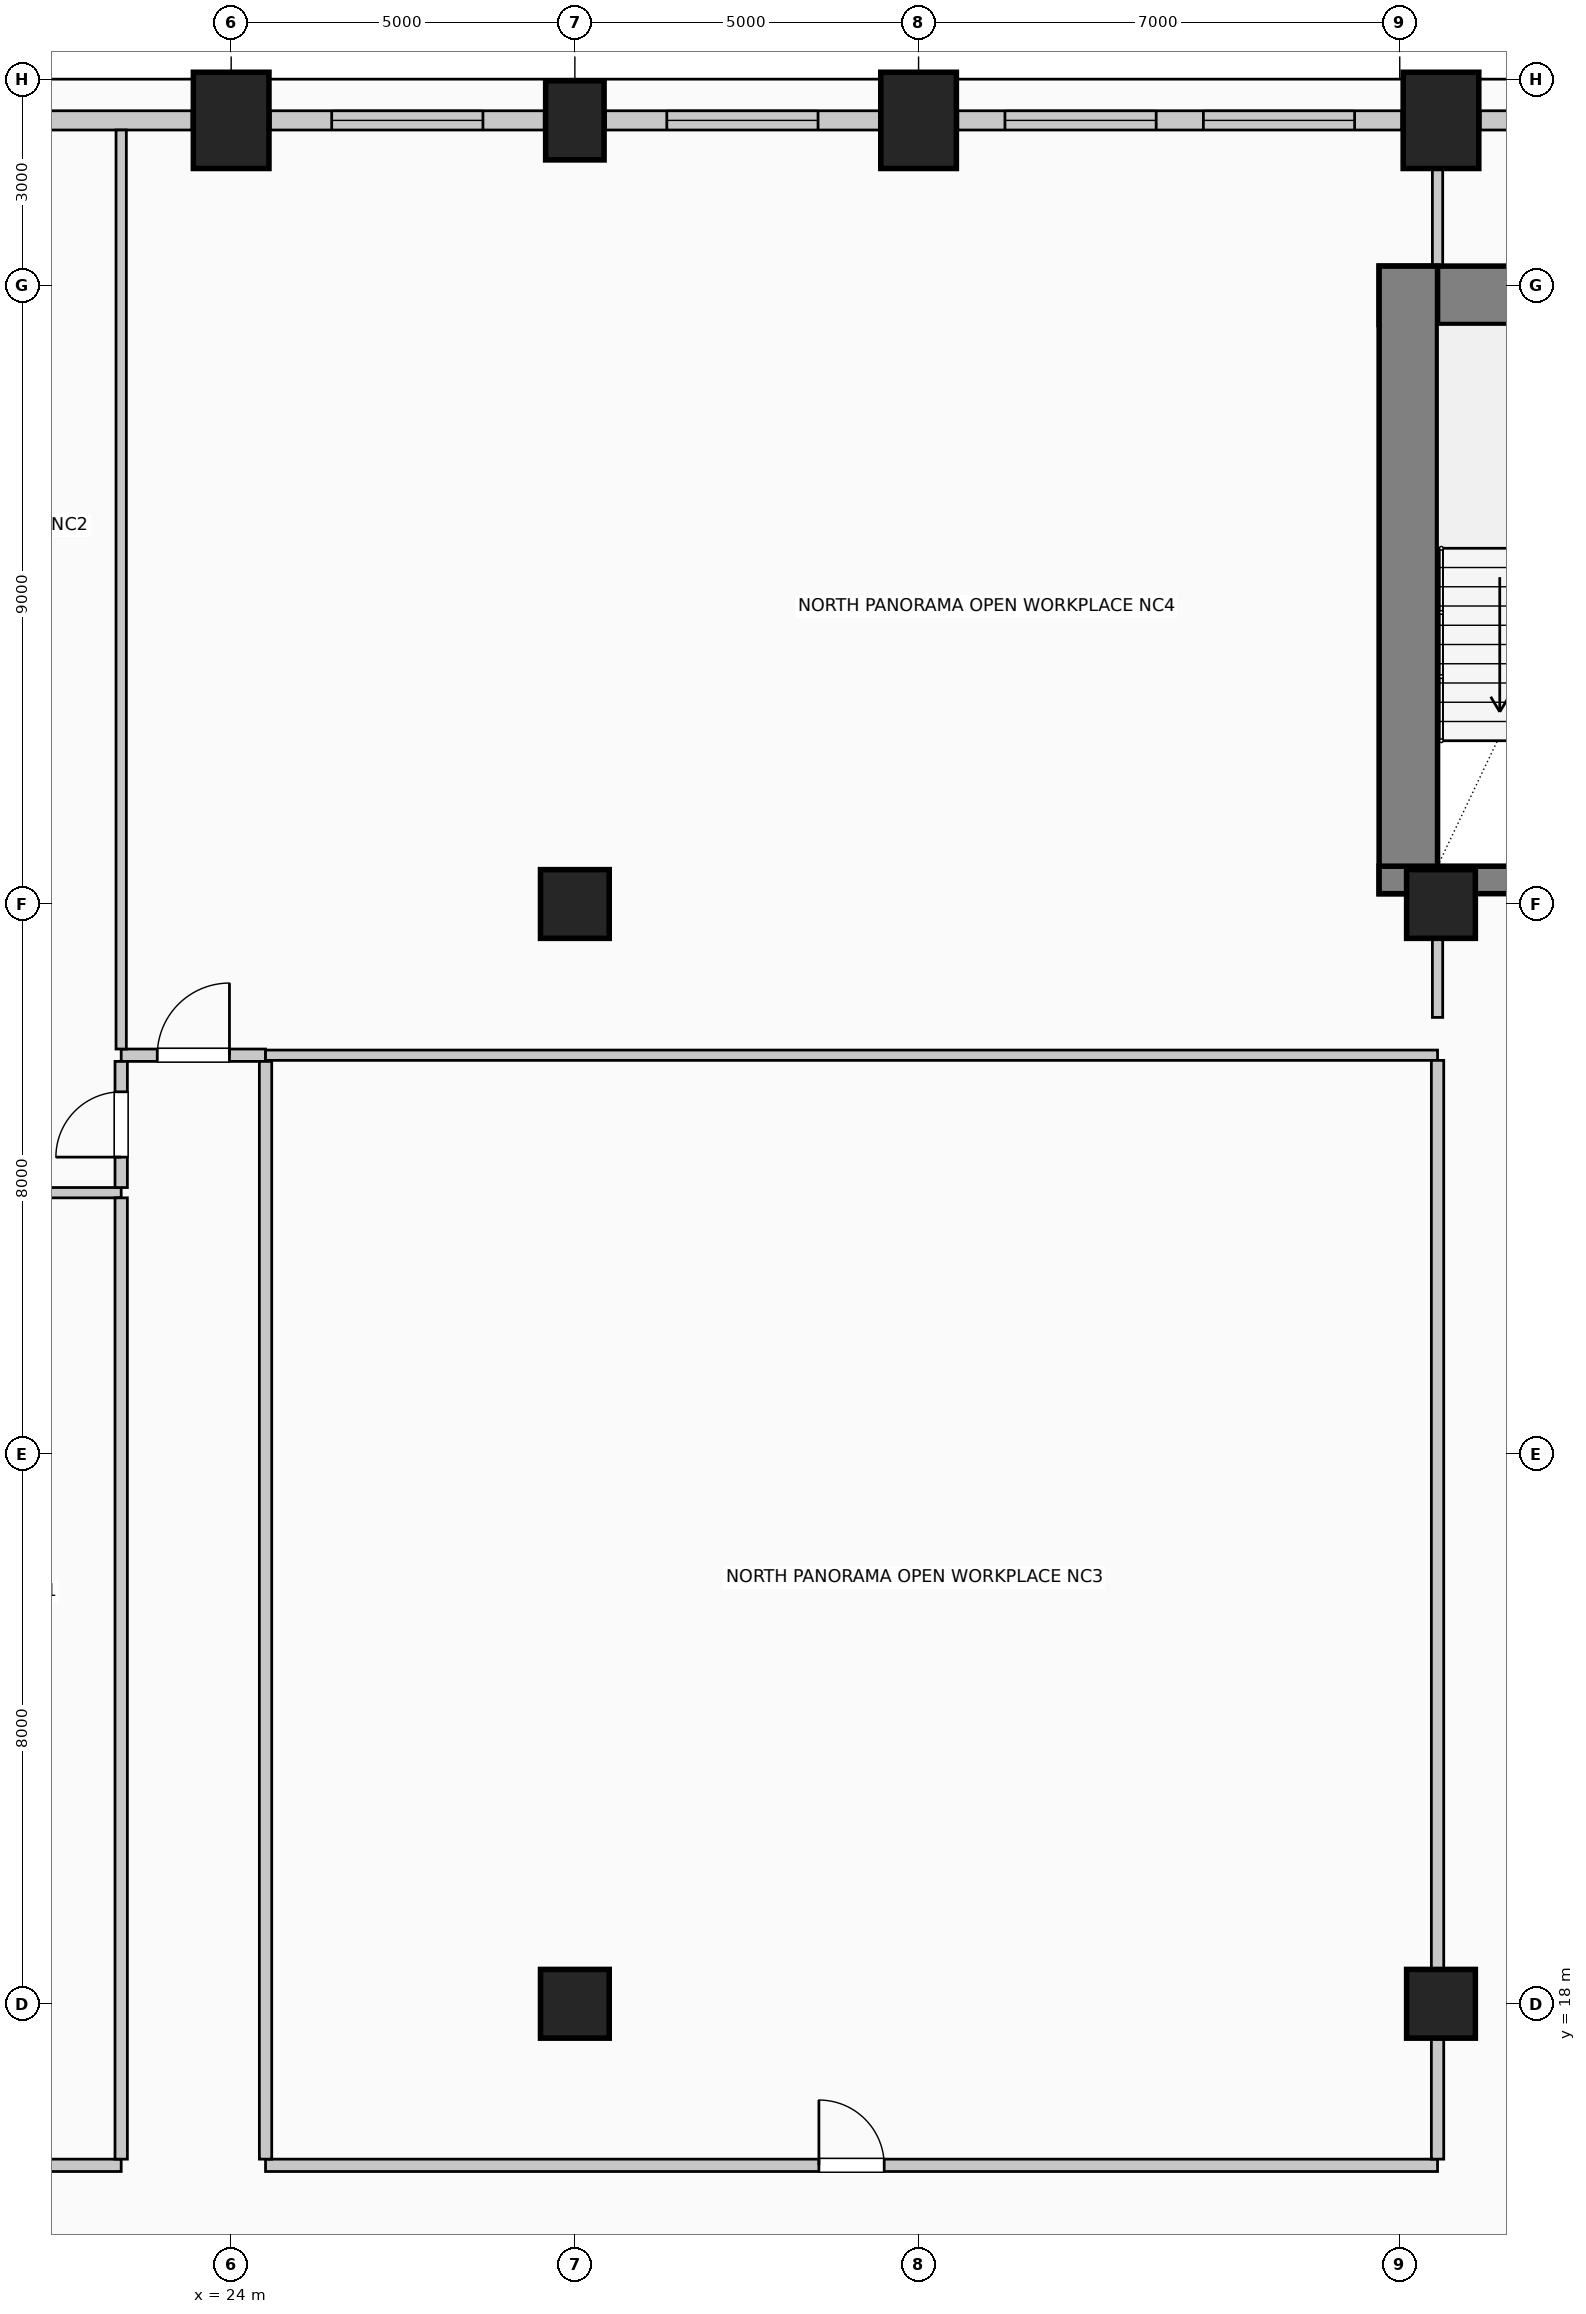
"""IFC4 building model, lengths in metres.
Left out: names, types, materials, properties, quantities, classifications, styles, units other than length and angle.
Written with IfcOpenShell. Run it as: python <this file> out.ifc"""

import sys

from ifc_helpers import new_model, si_unit, direction, frame, frame_2d, origin, origin_2d, place, context, subcontext, project, spatial, rectangle, circle, extrude, element, fill, save


model = new_model("IFC4")
c1 = context("Model", 3, precision=1e-05, world=origin(), true_north=direction((0.0, 1.0)))
c2 = subcontext(c1, "Body", "Model", "MODEL_VIEW")
j1 = project(units=[si_unit("LENGTHUNIT", "METRE"), si_unit("PLANEANGLEUNIT", "RADIAN")], contexts=[c1])
p1 = place(None, origin())
s1 = spatial("IfcSite", under=j1, at=p1, CompositionType="ELEMENT")
p2 = place(p1, origin())
s2 = spatial("IfcBuilding", under=s1, at=p2, CompositionType="ELEMENT")
p3 = place(p2, frame((0.0, 0.0, 140.6)))
s3 = spatial("IfcBuildingStorey", under=s2, at=p3, CompositionType="ELEMENT", Elevation=140.6)
p4 = place(p3, frame((40.7, 42.855, 0.0), z_axis=(0.0, 0.0, 1.0), x_axis=(1.0, 0.0, 0.0)))
e1 = element("IfcWall", 1, at=p4, inside=s3, PredefinedType="SHEAR", context=c2, shape_type="SweptSolid", body=[
    extrude(rectangle(XDim=14.6, YDim=0.85, at=frame_2d((7.3, 0.0))), origin(), (0.0, 0.0, 1.0), 4.0),
])
p5 = place(p3, frame((41.125, 34.15, 0.0), z_axis=(0.0, 0.0, 1.0), x_axis=(0.0, 1.0, 0.0)))
e2 = element("IfcWall", 2, at=p5, inside=s3, PredefinedType="SHEAR", context=c2, shape_type="SweptSolid", body=[
    extrude(rectangle(XDim=9.13, YDim=0.85, at=frame_2d((4.565, 0.0))), origin(), (0.0, 0.0, 1.0), 4.0),
])
p6 = place(p3, frame((40.7, 34.35, 0.0), z_axis=(0.0, 0.0, 1.0), x_axis=(1.0, 0.0, 0.0)))
e3 = element("IfcWall", 3, at=p6, inside=s3, PredefinedType="SHEAR", context=c2, shape_type="SweptSolid", body=[
    extrude(rectangle(XDim=5.01, YDim=0.4, at=frame_2d((2.505, 0.0))), origin(), (0.0, 0.0, 1.0), 4.0),
])
p7 = place(p6, frame((2.4, 0.0, 0.0)))
e4 = element("IfcOpeningElement", 4, at=p7, cuts=e3, PredefinedType="OPENING", context=c2, shape_type="SweptSolid", body=[
    extrude(rectangle(XDim=1.15, YDim=2.2, at=frame_2d((0.575, 1.1))), frame((0.0, 0.21, 0.0), z_axis=(0.0, -1.0, 0.0), x_axis=(1.0, 0.0, 0.0)), (0.0, 0.0, 1.0), 0.42),
])
p8 = place(p3, frame((24.0, 45.4, 0.0), z_axis=(0.0, 0.0, 1.0), x_axis=(1.0, 0.0, 0.0)))
e5 = element("IfcColumn", 5, at=p8, inside=s3, PredefinedType="COLUMN", context=c2, shape_type="SweptSolid", body=[
    extrude(rectangle(XDim=1.1, YDim=1.4, at=origin_2d()), origin(), (0.0, 0.0, 1.0), 4.0),
])
p9 = place(p3, frame((29.0, 45.4, 0.0), z_axis=(0.0, 0.0, 1.0), x_axis=(1.0, 0.0, 0.0)))
e6 = element("IfcColumn", 6, at=p9, inside=s3, PredefinedType="COLUMN", context=c2, shape_type="SweptSolid", body=[
    extrude(rectangle(XDim=0.85, YDim=1.15, at=origin_2d()), origin(), (0.0, 0.0, 1.0), 4.0),
])
for number, where, z_axis, x_axis in (
    (7, (34.0, 45.4, 0.0), (0.0, 0.0, 1.0), (1.0, 0.0, 0.0)),
    (8, (41.6, 45.4, 0.0), (0.0, 0.0, 1.0), (1.0, 0.0, 0.0)),
):
    element("IfcColumn", number, at=place(p3, frame(where, z_axis=z_axis, x_axis=x_axis)), inside=s3, PredefinedType="COLUMN", context=c2, shape_type="SweptSolid", body=[
        extrude(rectangle(XDim=1.1, YDim=1.4, at=origin_2d()), origin(), (0.0, 0.0, 1.0), 4.0),
    ])
for number, where, z_axis, x_axis in (
    (9, (29.0, 18.0, 0.0), (0.0, 0.0, 1.0), (1.0, 0.0, 0.0)),
    (10, (29.0, 34.0, 0.0), (0.0, 0.0, 1.0), (1.0, 0.0, 0.0)),
    (11, (41.6, 18.0, 0.0), (0.0, 0.0, 1.0), (1.0, 0.0, 0.0)),
    (12, (41.6, 34.0, 0.0), (0.0, 0.0, 1.0), (1.0, 0.0, 0.0)),
):
    element("IfcColumn", number, at=place(p3, frame(where, z_axis=z_axis, x_axis=x_axis)), inside=s3, PredefinedType="COLUMN", context=c2, shape_type="SweptSolid", body=[
        extrude(circle(Radius=0.5, at=origin_2d()), origin(), (0.0, 0.0, 1.0), 4.0),
    ])
p10 = place(p3, frame((16.97, 45.4, 0.0), z_axis=(0.0, 0.0, 1.0), x_axis=(1.0, 0.0, 0.0)))
e13 = element("IfcWall", 13, at=p10, inside=s3, PredefinedType="SOLIDWALL", context=c2, shape_type="SweptSolid", body=[
    extrude(rectangle(XDim=6.46, YDim=0.28, at=frame_2d((3.23, 0.0))), origin(), (0.0, 0.0, 1.0), 2.875),
])
p11 = place(p10, frame((0.687, 0.0, 0.5)))
e14 = element("IfcOpeningElement", 14, at=p11, cuts=e13, PredefinedType="OPENING", context=c2, shape_type="SweptSolid", body=[
    extrude(rectangle(XDim=2.2, YDim=1.95, at=frame_2d((1.1, 0.975))), frame((0.0, 0.15, 0.0), z_axis=(0.0, -1.0, 0.0), x_axis=(1.0, 0.0, 0.0)), (0.0, 0.0, 1.0), 0.3),
])
p12 = place(p3, frame((24.57, 45.4, 0.0), z_axis=(0.0, 0.0, 1.0), x_axis=(1.0, 0.0, 0.0)))
e15 = element("IfcWall", 15, at=p12, inside=s3, PredefinedType="SOLIDWALL", context=c2, shape_type="SweptSolid", body=[
    extrude(rectangle(XDim=3.985, YDim=0.28, at=frame_2d((1.992, 0.0))), origin(), (0.0, 0.0, 1.0), 2.875),
])
p13 = place(p12, frame((0.893, 0.0, 0.5)))
e16 = element("IfcOpeningElement", 16, at=p13, cuts=e15, PredefinedType="OPENING", context=c2, shape_type="SweptSolid", body=[
    extrude(rectangle(XDim=2.2, YDim=1.95, at=frame_2d((1.1, 0.975))), frame((0.0, 0.15, 0.0), z_axis=(0.0, -1.0, 0.0), x_axis=(1.0, 0.0, 0.0)), (0.0, 0.0, 1.0), 0.3),
])
p14 = place(p3, frame((29.445, 45.4, 0.0), z_axis=(0.0, 0.0, 1.0), x_axis=(1.0, 0.0, 0.0)))
e17 = element("IfcWall", 17, at=p14, inside=s3, PredefinedType="SOLIDWALL", context=c2, shape_type="SweptSolid", body=[
    extrude(rectangle(XDim=3.985, YDim=0.28, at=frame_2d((1.992, 0.0))), origin(), (0.0, 0.0, 1.0), 2.875),
])
p15 = place(p14, frame((0.893, 0.0, 0.5)))
e18 = element("IfcOpeningElement", 18, at=p15, cuts=e17, PredefinedType="OPENING", context=c2, shape_type="SweptSolid", body=[
    extrude(rectangle(XDim=2.2, YDim=1.95, at=frame_2d((1.1, 0.975))), frame((0.0, 0.15, 0.0), z_axis=(0.0, -1.0, 0.0), x_axis=(1.0, 0.0, 0.0)), (0.0, 0.0, 1.0), 0.3),
])
p16 = place(p3, frame((34.57, 45.4, 0.0), z_axis=(0.0, 0.0, 1.0), x_axis=(1.0, 0.0, 0.0)))
e19 = element("IfcWall", 19, at=p16, inside=s3, PredefinedType="SOLIDWALL", context=c2, shape_type="SweptSolid", body=[
    extrude(rectangle(XDim=6.46, YDim=0.28, at=frame_2d((3.23, 0.0))), origin(), (0.0, 0.0, 1.0), 2.875),
])
p17 = place(p16, frame((0.687, 0.0, 0.5)))
e20 = element("IfcOpeningElement", 20, at=p17, cuts=e19, PredefinedType="OPENING", context=c2, shape_type="SweptSolid", body=[
    extrude(rectangle(XDim=2.2, YDim=1.95, at=frame_2d((1.1, 0.975))), frame((0.0, 0.15, 0.0), z_axis=(0.0, -1.0, 0.0), x_axis=(1.0, 0.0, 0.0)), (0.0, 0.0, 1.0), 0.3),
])
p18 = place(p16, frame((3.573, 0.0, 0.5)))
e21 = element("IfcOpeningElement", 21, at=p18, cuts=e19, PredefinedType="OPENING", context=c2, shape_type="SweptSolid", body=[
    extrude(rectangle(XDim=2.2, YDim=1.95, at=frame_2d((1.1, 0.975))), frame((0.0, 0.15, 0.0), z_axis=(0.0, -1.0, 0.0), x_axis=(1.0, 0.0, 0.0)), (0.0, 0.0, 1.0), 0.3),
])
p19 = place(p3, frame((42.17, 45.4, 0.0), z_axis=(0.0, 0.0, 1.0), x_axis=(1.0, 0.0, 0.0)))
e22 = element("IfcWall", 22, at=p19, inside=s3, PredefinedType="SOLIDWALL", context=c2, shape_type="SweptSolid", body=[
    extrude(rectangle(XDim=1.385, YDim=0.28, at=frame_2d((0.692, 0.0))), origin(), (0.0, 0.0, 1.0), 2.875),
])
p20 = place(p3, frame((16.65, 15.65, 0.0), z_axis=(0.0, 0.0, 1.0), x_axis=(1.0, 0.0, 0.0)))
e23 = element("IfcWall", 23, at=p20, inside=s3, PredefinedType="PARTITIONING", context=c2, shape_type="SweptSolid", body=[
    extrude(rectangle(XDim=5.75, YDim=0.18, at=frame_2d((2.875, 0.0))), origin(), (0.0, 0.0, 1.0), 3.725),
])
p21 = place(p20, frame((2.35, 0.0, 0.0)))
e24 = element("IfcOpeningElement", 24, at=p21, cuts=e23, PredefinedType="OPENING", context=c2, shape_type="SweptSolid", body=[
    extrude(rectangle(XDim=1.05, YDim=2.15, at=frame_2d((0.525, 1.075))), frame((0.0, 0.1, 0.0), z_axis=(0.0, -1.0, 0.0), x_axis=(1.0, 0.0, 0.0)), (0.0, 0.0, 1.0), 0.2),
])
p22 = place(p3, frame((24.5, 15.65, 0.0), z_axis=(0.0, 0.0, 1.0), x_axis=(1.0, 0.0, 0.0)))
e25 = element("IfcWall", 25, at=p22, inside=s3, PredefinedType="PARTITIONING", context=c2, shape_type="SweptSolid", body=[
    extrude(rectangle(XDim=17.05, YDim=0.18, at=frame_2d((8.525, 0.0))), origin(), (0.0, 0.0, 1.0), 3.725),
])
p23 = place(p22, frame((8.05, 0.0, 0.0)))
e26 = element("IfcOpeningElement", 26, at=p23, cuts=e25, PredefinedType="OPENING", context=c2, shape_type="SweptSolid", body=[
    extrude(rectangle(XDim=0.95, YDim=2.15, at=frame_2d((0.475, 1.075))), frame((0.0, 0.1, 0.0), z_axis=(0.0, -1.0, 0.0), x_axis=(1.0, 0.0, 0.0)), (0.0, 0.0, 1.0), 0.2),
])
p24 = place(p3, frame((16.65, 29.8, 0.0), z_axis=(0.0, 0.0, 1.0), x_axis=(1.0, 0.0, 0.0)))
e27 = element("IfcWall", 27, at=p24, inside=s3, PredefinedType="PARTITIONING", context=c2, shape_type="SweptSolid", body=[
    extrude(rectangle(XDim=5.75, YDim=0.15, at=frame_2d((2.875, 0.0))), origin(), (0.0, 0.0, 1.0), 3.725),
])
p25 = place(p3, frame((22.4, 31.8, 0.0), z_axis=(0.0, 0.0, 1.0), x_axis=(1.0, 0.0, 0.0)))
e28 = element("IfcWall", 28, at=p25, inside=s3, PredefinedType="PARTITIONING", context=c2, shape_type="SweptSolid", body=[
    extrude(rectangle(XDim=2.1, YDim=0.18, at=frame_2d((1.05, 0.0))), origin(), (0.0, 0.0, 1.0), 3.725),
])
p26 = place(p25, frame((0.525, 0.0, 0.0)))
e29 = element("IfcOpeningElement", 29, at=p26, cuts=e28, PredefinedType="OPENING", context=c2, shape_type="SweptSolid", body=[
    extrude(rectangle(XDim=1.05, YDim=2.15, at=frame_2d((0.525, 1.075))), frame((0.0, 0.1, 0.0), z_axis=(0.0, -1.0, 0.0), x_axis=(1.0, 0.0, 0.0)), (0.0, 0.0, 1.0), 0.2),
])
p27 = place(p3, frame((24.5, 31.8, 0.0), z_axis=(0.0, 0.0, 1.0), x_axis=(1.0, 0.0, 0.0)))
e30 = element("IfcWall", 30, at=p27, inside=s3, PredefinedType="PARTITIONING", context=c2, shape_type="SweptSolid", body=[
    extrude(rectangle(XDim=17.05, YDim=0.15, at=frame_2d((8.525, 0.0))), origin(), (0.0, 0.0, 1.0), 3.725),
])
p28 = place(p3, frame((22.4, 15.74, 0.0), z_axis=(0.0, 0.0, 1.0), x_axis=(0.0, 1.0, 0.0)))
e31 = element("IfcWall", 31, at=p28, inside=s3, PredefinedType="PARTITIONING", context=c2, shape_type="SweptSolid", body=[
    extrude(rectangle(XDim=13.985, YDim=0.18, at=frame_2d((6.993, 0.0))), origin(), (0.0, 0.0, 1.0), 3.725),
])
p29 = place(p3, frame((22.4, 29.875, 0.0), z_axis=(0.0, 0.0, 1.0), x_axis=(0.0, 1.0, 0.0)))
e32 = element("IfcWall", 32, at=p29, inside=s3, PredefinedType="PARTITIONING", context=c2, shape_type="SweptSolid", body=[
    extrude(rectangle(XDim=1.835, YDim=0.18, at=frame_2d((0.917, 0.0))), origin(), (0.0, 0.0, 1.0), 3.725),
])
p30 = place(p29, frame((0.442, 0.0, 0.0)))
e33 = element("IfcOpeningElement", 33, at=p30, cuts=e32, PredefinedType="OPENING", context=c2, shape_type="SweptSolid", body=[
    extrude(rectangle(XDim=0.95, YDim=2.15, at=frame_2d((0.475, 1.075))), frame((0.0, 0.1, 0.0), z_axis=(0.0, -1.0, 0.0), x_axis=(1.0, 0.0, 0.0)), (0.0, 0.0, 1.0), 0.2),
])
p31 = place(p3, frame((22.4, 31.89, 0.0), z_axis=(0.0, 0.0, 1.0), x_axis=(0.0, 1.0, 0.0)))
e34 = element("IfcWall", 34, at=p31, inside=s3, PredefinedType="PARTITIONING", context=c2, shape_type="SweptSolid", body=[
    extrude(rectangle(XDim=13.37, YDim=0.15, at=frame_2d((6.685, 0.0))), origin(), (0.0, 0.0, 1.0), 3.725),
])
p32 = place(p3, frame((24.5, 15.74, 0.0), z_axis=(0.0, 0.0, 1.0), x_axis=(0.0, 1.0, 0.0)))
e35 = element("IfcWall", 35, at=p32, inside=s3, PredefinedType="PARTITIONING", context=c2, shape_type="SweptSolid", body=[
    extrude(rectangle(XDim=15.97, YDim=0.18, at=frame_2d((7.985, 0.0))), origin(), (0.0, 0.0, 1.0), 3.725),
])
p33 = place(p3, frame((41.55, 15.74, 0.0), z_axis=(0.0, 0.0, 1.0), x_axis=(0.0, 1.0, 0.0)))
e36 = element("IfcWall", 36, at=p33, inside=s3, PredefinedType="PARTITIONING", context=c2, shape_type="SweptSolid", body=[
    extrude(rectangle(XDim=1.76, YDim=0.18, at=frame_2d((0.88, 0.0))), origin(), (0.0, 0.0, 1.0), 3.07),
])
p34 = place(p3, frame((41.55, 18.5, 0.0), z_axis=(0.0, 0.0, 1.0), x_axis=(0.0, 1.0, 0.0)))
e37 = element("IfcWall", 37, at=p34, inside=s3, PredefinedType="PARTITIONING", context=c2, shape_type="SweptSolid", body=[
    extrude(rectangle(XDim=13.225, YDim=0.18, at=frame_2d((6.613, 0.0))), origin(), (0.0, 0.0, 1.0), 3.07),
])
p35 = place(p3, frame((41.55, 32.35, 0.0), z_axis=(0.0, 0.0, 1.0), x_axis=(0.0, 1.0, 0.0)))
e38 = element("IfcWall", 38, at=p35, inside=s3, PredefinedType="PARTITIONING", context=c2, shape_type="SweptSolid", body=[
    extrude(rectangle(XDim=1.15, YDim=0.15, at=frame_2d((0.575, 0.0))), origin(), (0.0, 0.0, 1.0), 3.07),
])
p36 = place(p3, frame((41.55, 43.28, 0.0), z_axis=(0.0, 0.0, 1.0), x_axis=(0.0, 1.0, 0.0)))
e39 = element("IfcWall", 39, at=p36, inside=s3, PredefinedType="PARTITIONING", context=c2, shape_type="SweptSolid", body=[
    extrude(rectangle(XDim=1.42, YDim=0.15, at=frame_2d((0.71, 0.0))), origin(), (0.0, 0.0, 1.0), 3.725),
])
p37 = place(p13, origin())
e40 = element("IfcWindow", 40, at=p37, inside=s3, PartitioningType="SINGLE_PANEL", PredefinedType="WINDOW", context=c2, shape_type="SweptSolid", body=[
    extrude(rectangle(XDim=2.2, YDim=1.95, at=frame_2d((1.1, 0.975))), frame((0.0, 0.03, 0.0), z_axis=(0.0, -1.0, 0.0), x_axis=(1.0, 0.0, 0.0)), (0.0, 0.0, 1.0), 0.06),
])
fill(e16, e40)
p38 = place(p15, origin())
e41 = element("IfcWindow", 41, at=p38, inside=s3, PartitioningType="SINGLE_PANEL", PredefinedType="WINDOW", context=c2, shape_type="SweptSolid", body=[
    extrude(rectangle(XDim=2.2, YDim=1.95, at=frame_2d((1.1, 0.975))), frame((0.0, 0.03, 0.0), z_axis=(0.0, -1.0, 0.0), x_axis=(1.0, 0.0, 0.0)), (0.0, 0.0, 1.0), 0.06),
])
fill(e18, e41)
p39 = place(p17, origin())
e42 = element("IfcWindow", 42, at=p39, inside=s3, PartitioningType="SINGLE_PANEL", PredefinedType="WINDOW", context=c2, shape_type="SweptSolid", body=[
    extrude(rectangle(XDim=2.2, YDim=1.95, at=frame_2d((1.1, 0.975))), frame((0.0, 0.03, 0.0), z_axis=(0.0, -1.0, 0.0), x_axis=(1.0, 0.0, 0.0)), (0.0, 0.0, 1.0), 0.06),
])
fill(e20, e42)
p40 = place(p18, origin())
e43 = element("IfcWindow", 43, at=p40, inside=s3, PartitioningType="SINGLE_PANEL", PredefinedType="WINDOW", context=c2, shape_type="SweptSolid", body=[
    extrude(rectangle(XDim=2.2, YDim=1.95, at=frame_2d((1.1, 0.975))), frame((0.0, 0.03, 0.0), z_axis=(0.0, -1.0, 0.0), x_axis=(1.0, 0.0, 0.0)), (0.0, 0.0, 1.0), 0.06),
])
fill(e21, e43)
p41 = place(p23, origin())
e44 = element("IfcDoor", 44, at=p41, inside=s3, OperationType="SINGLE_SWING_LEFT", PredefinedType="DOOR", context=c2, shape_type="SweptSolid", body=[
    extrude(rectangle(XDim=0.95, YDim=2.15, at=frame_2d((0.475, 1.075))), frame((0.0, 0.025, 0.0), z_axis=(0.0, -1.0, 0.0), x_axis=(1.0, 0.0, 0.0)), (0.0, 0.0, 1.0), 0.05),
])
fill(e26, e44)
p42 = place(p26, origin())
e45 = element("IfcDoor", 45, at=p42, inside=s3, OperationType="SINGLE_SWING_RIGHT", PredefinedType="DOOR", context=c2, shape_type="SweptSolid", body=[
    extrude(rectangle(XDim=1.05, YDim=2.15, at=frame_2d((0.525, 1.075))), frame((0.0, 0.025, 0.0), z_axis=(0.0, -1.0, 0.0), x_axis=(1.0, 0.0, 0.0)), (0.0, 0.0, 1.0), 0.05),
])
fill(e29, e45)
p43 = place(p30, origin())
e46 = element("IfcDoor", 46, at=p43, inside=s3, OperationType="SINGLE_SWING_LEFT", PredefinedType="DOOR", context=c2, shape_type="SweptSolid", body=[
    extrude(rectangle(XDim=0.95, YDim=2.15, at=frame_2d((0.475, 1.075))), frame((0.0, 0.025, 0.0), z_axis=(0.0, -1.0, 0.0), x_axis=(1.0, 0.0, 0.0)), (0.0, 0.0, 1.0), 0.05),
])
fill(e33, e46)
save(model, sys.argv[1])
